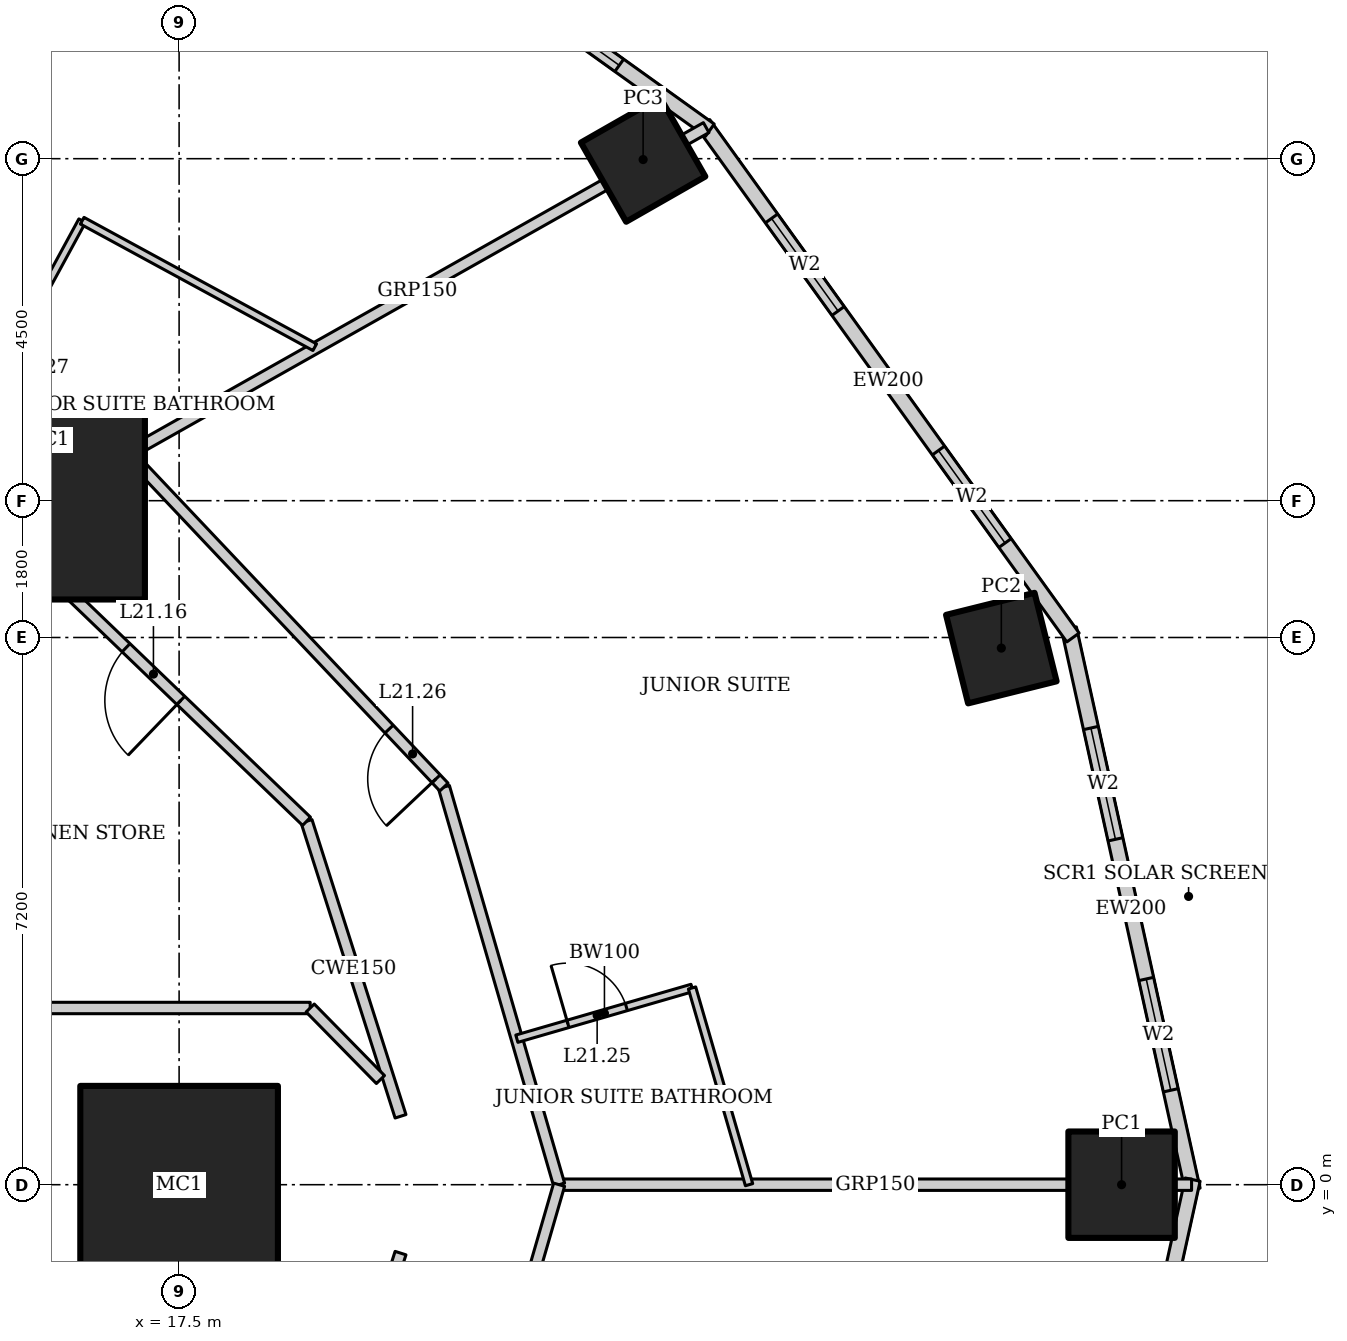
"""IFC4 building model, lengths in metres.
Left out: names, types, materials, properties, quantities, classifications, styles, units other than length and angle.
Written with IfcOpenShell. Run it as: python <this file> out.ifc"""

import sys

from ifc_helpers import new_model, si_unit, direction, frame, frame_2d, origin, origin_2d, place, context, subcontext, project, spatial, rectangle, hollow_rectangle, extrude, element, fill, save


model = new_model("IFC4")
c1 = context("Model", 3, precision=1e-05, world=origin(), true_north=direction((0.0, 1.0)))
c2 = subcontext(c1, "Body", "Model", "MODEL_VIEW")
j1 = project(units=[si_unit("LENGTHUNIT", "METRE"), si_unit("PLANEANGLEUNIT", "RADIAN")], contexts=[c1])
p1 = place(None, origin())
s1 = spatial("IfcSite", under=j1, at=p1, CompositionType="ELEMENT")
p2 = place(p1, origin())
s2 = spatial("IfcBuilding", under=s1, at=p2, CompositionType="ELEMENT")
p3 = place(p2, frame((0.0, 0.0, 91.0)))
s3 = spatial("IfcBuildingStorey", under=s2, at=p3, CompositionType="ELEMENT", Elevation=91.0)
for number, where, z_axis, x_axis in (
    (1, (17.5, 0.0, 0.0), (0.0, 0.0, 1.0), (1.0, 0.0, 0.0)),
    (2, (15.75, 9.0, 0.0), (0.0, 0.0, 1.0), (1.0, 0.0, 0.0)),
):
    element("IfcColumn", number, at=place(p3, frame(where, z_axis=z_axis, x_axis=x_axis)), inside=s3, PredefinedType="COLUMN", context=c2, shape_type="SweptSolid", body=[
        extrude(hollow_rectangle(XDim=2.6, YDim=2.6, WallThickness=0.13, at=origin_2d()), origin(), (0.0, 0.0, 1.0), 3.6),
    ])
p4 = place(p3, frame((29.9, 0.0, 0.0), z_axis=(0.0, 0.0, 1.0), x_axis=(1.0, 0.0, 0.0)))
e3 = element("IfcColumn", 3, at=p4, inside=s3, PredefinedType="COLUMN", context=c2, shape_type="SweptSolid", body=[
    extrude(hollow_rectangle(XDim=1.4, YDim=1.4, WallThickness=0.1, at=origin_2d()), origin(), (0.0, 0.0, 1.0), 3.6),
])
p5 = place(p3, frame((28.318, 7.06, 0.0), z_axis=(0.0, 0.0, 1.0), x_axis=(0.970295726276, 0.2419218956, 0.0)))
e4 = element("IfcColumn", 4, at=p5, inside=s3, PredefinedType="COLUMN", context=c2, shape_type="SweptSolid", body=[
    extrude(hollow_rectangle(XDim=1.2, YDim=1.2, WallThickness=0.1, at=origin_2d()), origin(), (0.0, 0.0, 1.0), 3.6),
])
p6 = place(p3, frame((23.605, 13.489, 0.0), z_axis=(0.0, 0.0, 1.0), x_axis=(0.86824298017, 0.496139221777, 0.0)))
e5 = element("IfcColumn", 5, at=p6, inside=s3, PredefinedType="COLUMN", context=c2, shape_type="SweptSolid", body=[
    extrude(hollow_rectangle(XDim=1.2, YDim=1.2, WallThickness=0.12, at=origin_2d()), origin(), (0.0, 0.0, 1.0), 3.6),
])
p7 = place(p3, frame((30.835, -0.067, 0.0), z_axis=(0.0, 0.0, 1.0), x_axis=(-0.215238065514, 0.976561608478, 0.0)))
e6 = element("IfcWall", 6, at=p7, inside=s3, PredefinedType="SOLIDWALL", context=c2, shape_type="SweptSolid", body=[
    extrude(rectangle(XDim=7.562, YDim=0.2, at=frame_2d((3.781, 0.0))), origin(), (0.0, 0.0, 1.0), 3.45),
])
p8 = place(p7, frame((1.341, 0.0, 0.5)))
e7 = element("IfcOpeningElement", 7, at=p8, cuts=e6, PredefinedType="OPENING", context=c2, shape_type="SweptSolid", body=[
    extrude(rectangle(XDim=1.5, YDim=2.2, at=frame_2d((0.75, 1.1))), frame((0.0, 0.11, 0.0), z_axis=(0.0, -1.0, 0.0), x_axis=(1.0, 0.0, 0.0)), (0.0, 0.0, 1.0), 0.22),
])
p9 = place(p7, frame((4.722, 0.0, 0.5)))
e8 = element("IfcOpeningElement", 8, at=p9, cuts=e6, PredefinedType="OPENING", context=c2, shape_type="SweptSolid", body=[
    extrude(rectangle(XDim=1.5, YDim=2.2, at=frame_2d((0.75, 1.1))), frame((0.0, 0.11, 0.0), z_axis=(0.0, -1.0, 0.0), x_axis=(1.0, 0.0, 0.0)), (0.0, 0.0, 1.0), 0.22),
])
p10 = place(p3, frame((29.26, 7.2, 0.0), z_axis=(0.0, 0.0, 1.0), x_axis=(-0.583937613703, 0.811798536155, 0.0)))
e9 = element("IfcWall", 9, at=p10, inside=s3, PredefinedType="SOLIDWALL", context=c2, shape_type="SweptSolid", body=[
    extrude(rectangle(XDim=8.323, YDim=0.2, at=frame_2d((4.162, 0.0))), origin(), (0.0, 0.0, 1.0), 3.45),
])
p11 = place(p10, frame((1.531, 0.0, 0.5)))
e10 = element("IfcOpeningElement", 10, at=p11, cuts=e9, PredefinedType="OPENING", context=c2, shape_type="SweptSolid", body=[
    extrude(rectangle(XDim=1.5, YDim=2.2, at=frame_2d((0.75, 1.1))), frame((0.0, 0.11, 0.0), z_axis=(0.0, -1.0, 0.0), x_axis=(1.0, 0.0, 0.0)), (0.0, 0.0, 1.0), 0.22),
])
p12 = place(p10, frame((5.292, 0.0, 0.5)))
e11 = element("IfcOpeningElement", 11, at=p12, cuts=e9, PredefinedType="OPENING", context=c2, shape_type="SweptSolid", body=[
    extrude(rectangle(XDim=1.5, YDim=2.2, at=frame_2d((0.75, 1.1))), frame((0.0, 0.11, 0.0), z_axis=(0.0, -1.0, 0.0), x_axis=(1.0, 0.0, 0.0)), (0.0, 0.0, 1.0), 0.22),
])
p13 = place(p3, frame((24.482, 13.875, 0.0), z_axis=(0.0, 0.0, 1.0), x_axis=(-0.812791321576, 0.582554948112, 0.0)))
e12 = element("IfcWall", 12, at=p13, inside=s3, PredefinedType="SOLIDWALL", context=c2, shape_type="SweptSolid", body=[
    extrude(rectangle(XDim=8.063, YDim=0.2, at=frame_2d((4.032, 0.0))), origin(), (0.0, 0.0, 1.0), 3.45),
])
p14 = place(p13, frame((1.466, 0.0, 0.5)))
e13 = element("IfcOpeningElement", 13, at=p14, cuts=e12, PredefinedType="OPENING", context=c2, shape_type="SweptSolid", body=[
    extrude(rectangle(XDim=1.5, YDim=2.2, at=frame_2d((0.75, 1.1))), frame((0.0, 0.11, 0.0), z_axis=(0.0, -1.0, 0.0), x_axis=(1.0, 0.0, 0.0)), (0.0, 0.0, 1.0), 0.22),
])
p15 = place(p13, frame((5.097, 0.0, 0.5)))
e14 = element("IfcOpeningElement", 14, at=p15, cuts=e12, PredefinedType="OPENING", context=c2, shape_type="SweptSolid", body=[
    extrude(rectangle(XDim=1.5, YDim=2.2, at=frame_2d((0.75, 1.1))), frame((0.0, 0.11, 0.0), z_axis=(0.0, -1.0, 0.0), x_axis=(1.0, 0.0, 0.0)), (0.0, 0.0, 1.0), 0.22),
])
p16 = place(p3, frame((29.208, -7.318, 0.0), z_axis=(0.0, 0.0, 1.0), x_axis=(0.215238065514, 0.976561608478, 0.0)))
e15 = element("IfcWall", 15, at=p16, inside=s3, PredefinedType="SOLIDWALL", context=c2, shape_type="SweptSolid", body=[
    extrude(rectangle(XDim=7.562, YDim=0.2, at=frame_2d((3.781, 0.0))), origin(), (0.0, 0.0, 1.0), 3.45),
])
p17 = place(p16, frame((1.341, 0.0, 0.5)))
e16 = element("IfcOpeningElement", 16, at=p17, cuts=e15, PredefinedType="OPENING", context=c2, shape_type="SweptSolid", body=[
    extrude(rectangle(XDim=1.5, YDim=2.2, at=frame_2d((0.75, 1.1))), frame((0.0, 0.11, 0.0), z_axis=(0.0, -1.0, 0.0), x_axis=(1.0, 0.0, 0.0)), (0.0, 0.0, 1.0), 0.22),
])
p18 = place(p16, frame((4.722, 0.0, 0.5)))
e17 = element("IfcOpeningElement", 17, at=p18, cuts=e15, PredefinedType="OPENING", context=c2, shape_type="SweptSolid", body=[
    extrude(rectangle(XDim=1.5, YDim=2.2, at=frame_2d((0.75, 1.1))), frame((0.0, 0.11, 0.0), z_axis=(0.0, -1.0, 0.0), x_axis=(1.0, 0.0, 0.0)), (0.0, 0.0, 1.0), 0.22),
])
p19 = place(p3, frame((30.821, 0.0, 0.0), z_axis=(0.0, 0.0, 1.0), x_axis=(-1.0, 0.0, 0.0)))
e18 = element("IfcWall", 18, at=p19, inside=s3, PredefinedType="PARTITIONING", context=c2, shape_type="SweptSolid", body=[
    extrude(rectangle(XDim=8.321, YDim=0.15, at=frame_2d((4.16, 0.0))), origin(), (0.0, 0.0, 1.0), 2.528),
])
p20 = place(p3, frame((24.435, 13.909, 0.0), z_axis=(0.0, 0.0, 1.0), x_axis=(-0.87090601027, -0.491449612143, 0.0)))
e19 = element("IfcWall", 19, at=p20, inside=s3, PredefinedType="PARTITIONING", context=c2, shape_type="SweptSolid", body=[
    extrude(rectangle(XDim=8.726, YDim=0.15, at=frame_2d((4.363, 0.0))), origin(), (0.0, 0.0, 1.0), 2.693),
])
p21 = place(p3, frame((22.5, 0.0, 0.0), z_axis=(0.0, 0.0, 1.0), x_axis=(-0.278247435376, 0.960509429785, 0.0)))
e20 = element("IfcWall", 20, at=p21, inside=s3, PredefinedType="PARTITIONING", context=c2, shape_type="SweptSolid", body=[
    extrude(rectangle(XDim=5.447, YDim=0.15, at=frame_2d((2.724, 0.0))), origin(), (0.0, 0.0, 1.0), 3.45),
])
p22 = place(p3, frame((20.984, 5.232, 0.0), z_axis=(0.0, 0.0, 1.0), x_axis=(-0.687062608696, 0.726598218916, 0.0)))
e21 = element("IfcWall", 21, at=p22, inside=s3, PredefinedType="PARTITIONING", context=c2, shape_type="SweptSolid", body=[
    extrude(rectangle(XDim=6.039, YDim=0.15, at=frame_2d((3.02, 0.0))), origin(), (0.0, 0.0, 1.0), 3.45),
])
p23 = place(p22, frame((0.15, 0.0, 0.0)))
e22 = element("IfcOpeningElement", 22, at=p23, cuts=e21, PredefinedType="OPENING", context=c2, shape_type="SweptSolid", body=[
    extrude(rectangle(XDim=0.9, YDim=2.1, at=frame_2d((0.45, 1.05))), frame((0.0, 0.085, 0.0), z_axis=(0.0, -1.0, 0.0), x_axis=(1.0, 0.0, 0.0)), (0.0, 0.0, 1.0), 0.17),
])
p24 = place(p3, frame((16.835, 9.62, 0.0), z_axis=(0.0, 0.0, 1.0), x_axis=(-0.878450059298, 0.477834169267, 0.0)))
e23 = element("IfcWall", 23, at=p24, inside=s3, PredefinedType="PARTITIONING", context=c2, shape_type="SweptSolid", body=[
    extrude(rectangle(XDim=5.631, YDim=0.15, at=frame_2d((2.815, 0.0))), origin(), (0.0, 0.0, 1.0), 3.45),
])
p25 = place(p3, frame((20.984, -5.232, 0.0), z_axis=(0.0, 0.0, 1.0), x_axis=(0.278247435376, 0.960509429785, 0.0)))
e24 = element("IfcWall", 24, at=p25, inside=s3, PredefinedType="PARTITIONING", context=c2, shape_type="SweptSolid", body=[
    extrude(rectangle(XDim=5.447, YDim=0.15, at=frame_2d((2.724, 0.0))), origin(), (0.0, 0.0, 1.0), 3.45),
])
p26 = place(p25, frame((0.15, 0.0, 0.0)))
e25 = element("IfcOpeningElement", 25, at=p26, cuts=e24, PredefinedType="OPENING", context=c2, shape_type="SweptSolid", body=[
    extrude(rectangle(XDim=0.9, YDim=2.1, at=frame_2d((0.45, 1.05))), frame((0.0, 0.085, 0.0), z_axis=(0.0, -1.0, 0.0), x_axis=(1.0, 0.0, 0.0)), (0.0, 0.0, 1.0), 0.17),
])
p27 = place(p3, frame((20.413, 0.9, 0.0), z_axis=(0.0, 0.0, 1.0), x_axis=(-0.303505448228, 0.952829702988, 0.0)))
e26 = element("IfcWall", 26, at=p27, inside=s3, PredefinedType="PARTITIONING", context=c2, shape_type="SweptSolid", body=[
    extrude(rectangle(XDim=4.073, YDim=0.15, at=frame_2d((2.037, 0.0))), origin(), (0.0, 0.0, 1.0), 3.45),
])
p28 = place(p3, frame((19.177, 4.781, 0.0), z_axis=(0.0, 0.0, 1.0), x_axis=(-0.720837261072, 0.693104352209, 0.0)))
e27 = element("IfcWall", 27, at=p28, inside=s3, PredefinedType="PARTITIONING", context=c2, shape_type="SweptSolid", body=[
    extrude(rectangle(XDim=5.59, YDim=0.15, at=frame_2d((2.795, 0.0))), origin(), (0.0, 0.0, 1.0), 3.45),
])
p29 = place(p28, frame((2.295, 0.0, 0.0)))
e28 = element("IfcOpeningElement", 28, at=p29, cuts=e27, PredefinedType="OPENING", context=c2, shape_type="SweptSolid", body=[
    extrude(rectangle(XDim=1.0, YDim=2.1, at=frame_2d((0.5, 1.05))), frame((0.0, 0.085, 0.0), z_axis=(0.0, -1.0, 0.0), x_axis=(1.0, 0.0, 0.0)), (0.0, 0.0, 1.0), 0.17),
])
p30 = place(p3, frame((19.177, -4.781, 0.0), z_axis=(0.0, 0.0, 1.0), x_axis=(0.303505448228, 0.952829702988, 0.0)))
e29 = element("IfcWall", 29, at=p30, inside=s3, PredefinedType="PARTITIONING", context=c2, shape_type="SweptSolid", body=[
    extrude(rectangle(XDim=4.073, YDim=0.15, at=frame_2d((2.037, 0.0))), origin(), (0.0, 0.0, 1.0), 3.45),
])
p31 = place(p3, frame((21.943, 1.921, 0.0), z_axis=(0.0, 0.0, 1.0), x_axis=(0.960496317326, 0.278292695563, 0.0)))
e30 = element("IfcWall", 30, at=p31, inside=s3, PredefinedType="PARTITIONING", context=c2, shape_type="SweptSolid", body=[
    extrude(rectangle(XDim=2.4, YDim=0.1, at=frame_2d((1.2, 0.0))), origin(), (0.0, 0.0, 1.0), 3.45),
])
p32 = place(p31, frame((0.7, 0.0, 0.0)))
e31 = element("IfcOpeningElement", 31, at=p32, cuts=e30, PredefinedType="OPENING", context=c2, shape_type="SweptSolid", body=[
    extrude(rectangle(XDim=0.8, YDim=2.1, at=frame_2d((0.4, 1.05))), frame((0.0, 0.06, 0.0), z_axis=(0.0, -1.0, 0.0), x_axis=(1.0, 0.0, 0.0)), (0.0, 0.0, 1.0), 0.12),
])
p33 = place(p3, frame((24.249, 2.589, 0.0), z_axis=(0.0, 0.0, 1.0), x_axis=(0.278260412958, -0.960505670249, 0.0)))
e32 = element("IfcWall", 32, at=p33, inside=s3, PredefinedType="PARTITIONING", context=c2, shape_type="SweptSolid", body=[
    extrude(rectangle(XDim=2.695, YDim=0.1, at=frame_2d((1.348, 0.0))), origin(), (0.0, 0.0, 1.0), 3.45),
])
p34 = place(p3, frame((15.078, 10.576, 0.0), z_axis=(0.0, 0.0, 1.0), x_axis=(0.477832549678, 0.878450940274, 0.0)))
e33 = element("IfcWall", 33, at=p34, inside=s3, PredefinedType="PARTITIONING", context=c2, shape_type="SweptSolid", body=[
    extrude(rectangle(XDim=2.4, YDim=0.1, at=frame_2d((1.2, 0.0))), origin(), (0.0, 0.0, 1.0), 3.45),
])
p35 = place(p34, frame((0.7, 0.0, 0.0)))
e34 = element("IfcOpeningElement", 34, at=p35, cuts=e33, PredefinedType="OPENING", context=c2, shape_type="SweptSolid", body=[
    extrude(rectangle(XDim=0.8, YDim=2.1, at=frame_2d((0.4, 1.05))), frame((0.0, 0.06, 0.0), z_axis=(0.0, -1.0, 0.0), x_axis=(1.0, 0.0, 0.0)), (0.0, 0.0, 1.0), 0.12),
])
p36 = place(p3, frame((16.225, 12.684, 0.0), z_axis=(0.0, 0.0, 1.0), x_axis=(0.878473578893, -0.477790928322, 0.0)))
e35 = element("IfcWall", 35, at=p36, inside=s3, PredefinedType="PARTITIONING", context=c2, shape_type="SweptSolid", body=[
    extrude(rectangle(XDim=3.483, YDim=0.1, at=frame_2d((1.741, 0.0))), origin(), (0.0, 0.0, 1.0), 3.45),
])
p37 = place(p3, frame((15.775, 2.325, 0.0), z_axis=(0.0, 0.0, 1.0), x_axis=(1.0, 0.0, 0.0)))
e36 = element("IfcWall", 36, at=p37, inside=s3, PredefinedType="PARTITIONING", context=c2, shape_type="SweptSolid", body=[
    extrude(rectangle(XDim=3.449, YDim=0.15, at=frame_2d((1.725, 0.0))), origin(), (0.0, 0.0, 1.0), 3.45),
])
p38 = place(p3, frame((19.225, 2.325, 0.0), z_axis=(0.0, 0.0, 1.0), x_axis=(0.700694560486, -0.713461374501, 0.0)))
e37 = element("IfcWall", 37, at=p38, inside=s3, PredefinedType="PARTITIONING", context=c2, shape_type="SweptSolid", body=[
    extrude(rectangle(XDim=1.32, YDim=0.15, at=frame_2d((0.66, 0.0))), origin(), (0.0, 0.0, 1.0), 3.45),
])
p39 = place(p8, origin())
e38 = element("IfcWindow", 38, at=p39, inside=s3, PartitioningType="SINGLE_PANEL", PredefinedType="WINDOW", context=c2, shape_type="SweptSolid", body=[
    extrude(rectangle(XDim=1.5, YDim=2.2, at=frame_2d((0.75, 1.1))), frame((0.0, 0.03, 0.0), z_axis=(0.0, -1.0, 0.0), x_axis=(1.0, 0.0, 0.0)), (0.0, 0.0, 1.0), 0.06),
])
fill(e7, e38)
p40 = place(p9, origin())
e39 = element("IfcWindow", 39, at=p40, inside=s3, PartitioningType="SINGLE_PANEL", PredefinedType="WINDOW", context=c2, shape_type="SweptSolid", body=[
    extrude(rectangle(XDim=1.5, YDim=2.2, at=frame_2d((0.75, 1.1))), frame((0.0, 0.03, 0.0), z_axis=(0.0, -1.0, 0.0), x_axis=(1.0, 0.0, 0.0)), (0.0, 0.0, 1.0), 0.06),
])
fill(e8, e39)
p41 = place(p11, origin())
e40 = element("IfcWindow", 40, at=p41, inside=s3, PartitioningType="SINGLE_PANEL", PredefinedType="WINDOW", context=c2, shape_type="SweptSolid", body=[
    extrude(rectangle(XDim=1.5, YDim=2.2, at=frame_2d((0.75, 1.1))), frame((0.0, 0.03, 0.0), z_axis=(0.0, -1.0, 0.0), x_axis=(1.0, 0.0, 0.0)), (0.0, 0.0, 1.0), 0.06),
])
fill(e10, e40)
p42 = place(p12, origin())
e41 = element("IfcWindow", 41, at=p42, inside=s3, PartitioningType="SINGLE_PANEL", PredefinedType="WINDOW", context=c2, shape_type="SweptSolid", body=[
    extrude(rectangle(XDim=1.5, YDim=2.2, at=frame_2d((0.75, 1.1))), frame((0.0, 0.03, 0.0), z_axis=(0.0, -1.0, 0.0), x_axis=(1.0, 0.0, 0.0)), (0.0, 0.0, 1.0), 0.06),
])
fill(e11, e41)
p43 = place(p14, origin())
e42 = element("IfcWindow", 42, at=p43, inside=s3, PartitioningType="SINGLE_PANEL", PredefinedType="WINDOW", context=c2, shape_type="SweptSolid", body=[
    extrude(rectangle(XDim=1.5, YDim=2.2, at=frame_2d((0.75, 1.1))), frame((0.0, 0.03, 0.0), z_axis=(0.0, -1.0, 0.0), x_axis=(1.0, 0.0, 0.0)), (0.0, 0.0, 1.0), 0.06),
])
fill(e13, e42)
p44 = place(p29, origin())
e43 = element("IfcDoor", 43, at=p44, inside=s3, OperationType="SINGLE_SWING_LEFT", PredefinedType="DOOR", context=c2, shape_type="SweptSolid", body=[
    extrude(rectangle(XDim=1.0, YDim=2.1, at=frame_2d((0.5, 1.05))), frame((0.0, 0.025, 0.0), z_axis=(0.0, -1.0, 0.0), x_axis=(1.0, 0.0, 0.0)), (0.0, 0.0, 1.0), 0.05),
])
fill(e28, e43)
p45 = place(p32, origin())
e44 = element("IfcDoor", 44, at=p45, inside=s3, OperationType="SINGLE_SWING_LEFT", PredefinedType="DOOR", context=c2, shape_type="SweptSolid", body=[
    extrude(rectangle(XDim=0.8, YDim=2.1, at=frame_2d((0.4, 1.05))), frame((0.0, 0.025, 0.0), z_axis=(0.0, -1.0, 0.0), x_axis=(1.0, 0.0, 0.0)), (0.0, 0.0, 1.0), 0.05),
])
fill(e31, e44)
p46 = place(p23, origin())
e45 = element("IfcDoor", 45, at=p46, inside=s3, OperationType="SINGLE_SWING_LEFT", PredefinedType="DOOR", context=c2, shape_type="SweptSolid", body=[
    extrude(rectangle(XDim=0.9, YDim=2.1, at=frame_2d((0.45, 1.05))), frame((0.0, 0.025, 0.0), z_axis=(0.0, -1.0, 0.0), x_axis=(1.0, 0.0, 0.0)), (0.0, 0.0, 1.0), 0.05),
])
fill(e22, e45)
save(model, sys.argv[1])
